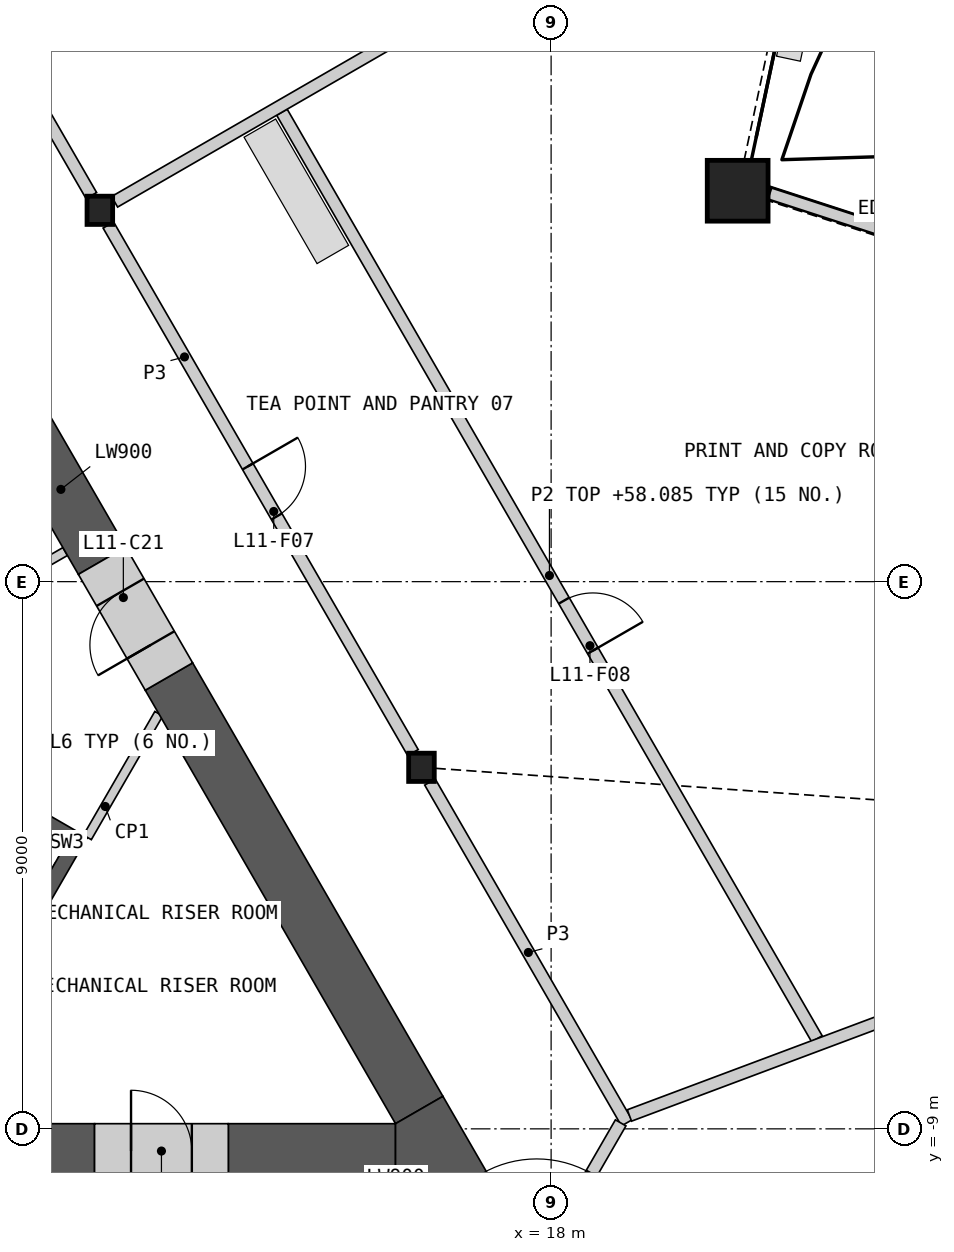
"""IFC4 building model, lengths in metres.
Left out: names, types, materials, properties, quantities, classifications, styles, units other than length and angle.
Written with IfcOpenShell. Run it as: python <this file> out.ifc"""

import sys

from ifc_helpers import new_model, si_unit, direction, frame, frame_2d, origin, origin_2d, place, context, subcontext, project, spatial, polyline, rectangle, hollow_rectangle, i_section, outline, extrude, element, fill, save


model = new_model("IFC4")
c1 = context("Model", 3, precision=1e-05, world=origin(), true_north=direction((0.0, 1.0)))
c2 = subcontext(c1, "Body", "Model", "MODEL_VIEW")
j1 = project(units=[si_unit("LENGTHUNIT", "METRE"), si_unit("PLANEANGLEUNIT", "RADIAN")], contexts=[c1])
p1 = place(None, origin())
s1 = spatial("IfcSite", under=j1, at=p1, CompositionType="ELEMENT")
p2 = place(p1, origin())
s2 = spatial("IfcBuilding", under=s1, at=p2, CompositionType="ELEMENT")
p3 = place(p2, frame((0.0, 0.0, 55.2)))
s3 = spatial("IfcBuildingStorey", under=s2, at=p3, CompositionType="ELEMENT", Elevation=55.2)
p4 = place(p3, frame((21.068, 6.429, 0.0), z_axis=(0.0, 0.0, 1.0), x_axis=(1.0, 0.0, 0.0)))
e1 = element("IfcColumn", 1, at=p4, inside=s3, PredefinedType="COLUMN", context=c2, shape_type="SweptSolid", body=[
    extrude(hollow_rectangle(XDim=1.0, YDim=1.0, WallThickness=0.07, at=origin_2d()), origin(), (0.0, 0.0, 1.0), 4.2),
])
for number, where, z_axis, x_axis in (
    (2, (15.868, -3.054, 0.0), (0.0, 0.0, 1.0), (1.0, 0.0, 0.0)),
    (3, (10.578, 6.107, 0.0), (0.0, 0.0, 1.0), (1.0, 0.0, 0.0)),
):
    element("IfcColumn", number, at=place(p3, frame(where, z_axis=z_axis, x_axis=x_axis)), inside=s3, PredefinedType="COLUMN", context=c2, shape_type="SweptSolid", body=[
        extrude(i_section(OverallWidth=0.421, OverallDepth=0.465, WebThickness=0.045, FlangeThickness=0.072, at=origin_2d()), origin(), (0.0, 0.0, 1.0), 4.2),
    ])
p5 = place(p3, frame((26.899, 4.661, 0.0), z_axis=(0.0, 0.0, 1.0), x_axis=(-0.951054004345, 0.309024725255, 0.0)))
e4 = element("IfcWall", 4, at=p5, inside=s3, PredefinedType="SOLIDWALL", context=c2, shape_type="SweptSolid", body=[
    extrude(rectangle(XDim=5.579, YDim=0.2, at=frame_2d((2.79, 0.0))), origin(), (0.0, 0.0, 1.0), 3.189),
])
p6 = place(p5, frame((1.91, 0.0, 0.0)))
e5 = element("IfcOpeningElement", 5, at=p6, cuts=e4, PredefinedType="OPENING", context=c2, shape_type="SweptSolid", body=[
    extrude(rectangle(XDim=1.6, YDim=2.4, at=frame_2d((0.8, 1.2))), frame((0.0, 0.11, 0.0), z_axis=(0.0, -1.0, 0.0), x_axis=(1.0, 0.0, 0.0)), (0.0, 0.0, 1.0), 0.22),
])
p7 = place(p3, origin())
e6 = element("IfcWall", 6, at=p7, inside=s3, PredefinedType="SHEAR", context=c2, shape_type="SweptSolid", body=[
    extrude(outline(polyline([(8.83, -6.881), (10.374, -4.206), (10.032, -4.298), (8.738, -6.539), (8.83, -6.881)])), origin(), (0.0, 0.0, 1.0), 3.8),
])
p8 = place(p3, origin())
e7 = element("IfcWall", 7, at=p8, inside=s3, PredefinedType="SHEAR", context=c2, shape_type="SweptSolid", body=[
    extrude(outline(polyline([(10.032, -4.298), (10.374, -4.206), (5.307, -1.281), (5.182, -1.498), (10.032, -4.298)])), origin(), (0.0, 0.0, 1.0), 3.8),
])
p9 = place(p3, frame((8.268, -0.509, 0.0), z_axis=(0.0, 0.0, 1.0), x_axis=(0.866035824272, 0.499981950752, 0.0)))
e8 = element("IfcWall", 8, at=p9, inside=s3, PredefinedType="PARTITIONING", context=c2, shape_type="SweptSolid", body=[
    extrude(rectangle(XDim=2.009, YDim=0.15, at=frame_2d((1.004, 0.0))), origin(), (0.0, 0.0, 1.0), 3.8),
])
p10 = place(p3, frame((10.374, -4.206, 0.0), z_axis=(0.0, 0.0, 1.0), x_axis=(0.499995339376, 0.86602809458, 0.0)))
e9 = element("IfcWall", 9, at=p10, inside=s3, PredefinedType="PARTITIONING", context=c2, shape_type="SweptSolid", body=[
    extrude(rectangle(XDim=2.349, YDim=0.15, at=frame_2d((1.175, 0.0))), origin(), (0.0, 0.0, 1.0), 3.8),
])
p11 = place(p3, frame((7.209, -9.365, 0.0), z_axis=(0.0, 0.0, 1.0), x_axis=(1.0, 0.0, 0.0)))
e10 = element("IfcWall", 10, at=p11, inside=s3, PredefinedType="SHEAR", context=c2, shape_type="SweptSolid", body=[
    extrude(rectangle(XDim=3.282, YDim=0.9, at=frame_2d((1.641, 0.0))), origin(), (0.0, 0.0, 1.0), 3.8),
])
p12 = place(p3, frame((12.691, -9.365, 0.0), z_axis=(0.0, 0.0, 1.0), x_axis=(1.0, 0.0, 0.0)))
e11 = element("IfcWall", 11, at=p12, inside=s3, PredefinedType="SHEAR", context=c2, shape_type="SweptSolid", body=[
    extrude(rectangle(XDim=2.75, YDim=0.9, at=frame_2d((1.375, 0.0))), origin(), (0.0, 0.0, 1.0), 3.8),
])
p13 = place(p3, frame((15.831, -8.69, 0.0), z_axis=(0.0, 0.0, 1.0), x_axis=(-0.499995435471, 0.8660280391, 0.0)))
e12 = element("IfcWall", 12, at=p13, inside=s3, PredefinedType="SHEAR", context=c2, shape_type="SweptSolid", body=[
    extrude(rectangle(XDim=8.232, YDim=0.9, at=frame_2d((4.116, 0.0))), origin(), (0.0, 0.0, 1.0), 3.8),
])
p14 = place(p3, frame((10.615, 0.344, 0.0), z_axis=(0.0, 0.0, 1.0), x_axis=(-0.500044870432, 0.865999496279, 0.0)))
e13 = element("IfcWall", 13, at=p14, inside=s3, PredefinedType="SHEAR", context=c2, shape_type="SweptSolid", body=[
    extrude(rectangle(XDim=2.709, YDim=0.9, at=frame_2d((1.354, 0.0))), origin(), (0.0, 0.0, 1.0), 3.8),
])
p15 = place(p3, origin())
e14 = element("IfcWall", 14, at=p15, inside=s3, PredefinedType="SHEAR", context=c2, shape_type="SweptSolid", body=[
    extrude(outline(polyline([(15.441, -9.815), (15.441, -8.915), (16.221, -8.465), (17.0, -9.815), (15.441, -9.815)])), origin(), (0.0, 0.0, 1.0), 3.8),
])
p16 = place(p3, frame((10.491, -9.365, 0.0), z_axis=(0.0, 0.0, 1.0), x_axis=(1.0, 0.0, 0.0)))
e15 = element("IfcWall", 15, at=p16, inside=s3, PredefinedType="SHEAR", context=c2, shape_type="SweptSolid", body=[
    extrude(rectangle(XDim=2.2, YDim=0.9, at=frame_2d((1.1, 0.0))), origin(), (0.0, 0.0, 1.0), 3.8),
])
p17 = place(p16, frame((0.6, 0.0, 0.0)))
e16 = element("IfcOpeningElement", 16, at=p17, cuts=e15, PredefinedType="OPENING", context=c2, shape_type="SweptSolid", body=[
    extrude(rectangle(XDim=1.0, YDim=2.1, at=frame_2d((0.5, 1.05))), frame((0.0, 0.46, 0.0), z_axis=(0.0, -1.0, 0.0), x_axis=(1.0, 0.0, 0.0)), (0.0, 0.0, 1.0), 0.92),
])
p18 = place(p3, frame((11.715, -1.561, 0.0), z_axis=(0.0, 0.0, 1.0), x_axis=(-0.499946605688, 0.86605622881, 0.0)))
e17 = element("IfcWall", 17, at=p18, inside=s3, PredefinedType="SHEAR", context=c2, shape_type="SweptSolid", body=[
    extrude(rectangle(XDim=2.2, YDim=0.9, at=frame_2d((1.1, 0.0))), origin(), (0.0, 0.0, 1.0), 3.8),
])
p19 = place(p18, frame((0.6, 0.0, 0.0)))
e18 = element("IfcOpeningElement", 18, at=p19, cuts=e17, PredefinedType="OPENING", context=c2, shape_type="SweptSolid", body=[
    extrude(rectangle(XDim=1.0, YDim=2.1, at=frame_2d((0.5, 1.05))), frame((0.0, 0.46, 0.0), z_axis=(0.0, -1.0, 0.0), x_axis=(1.0, 0.0, 0.0)), (0.0, 0.0, 1.0), 0.92),
])
p20 = place(p3, frame((5.429, 15.026, 0.0), z_axis=(0.0, 0.0, 1.0), x_axis=(0.50001002959, -0.86601961312, 0.0)))
e19 = element("IfcWall", 19, at=p20, inside=s3, PredefinedType="PARTITIONING", context=c2, shape_type="SweptSolid", body=[
    extrude(rectangle(XDim=10.019, YDim=0.2, at=frame_2d((5.009, 0.0))), origin(), (0.0, 0.0, 1.0), 3.8),
])
p21 = place(p20, frame((4.059, 0.0, 0.0)))
e20 = element("IfcOpeningElement", 20, at=p21, cuts=e19, PredefinedType="OPENING", context=c2, shape_type="SweptSolid", body=[
    extrude(rectangle(XDim=1.8, YDim=2.1, at=frame_2d((0.9, 1.05))), frame((0.0, 0.11, 0.0), z_axis=(0.0, -1.0, 0.0), x_axis=(1.0, 0.0, 0.0)), (0.0, 0.0, 1.0), 0.22),
])
p22 = place(p3, frame((10.719, 5.865, 0.0), z_axis=(0.0, 0.0, 1.0), x_axis=(0.49999175339, -0.866030164915, 0.0)))
e21 = element("IfcWall", 21, at=p22, inside=s3, PredefinedType="PARTITIONING", context=c2, shape_type="SweptSolid", body=[
    extrude(rectangle(XDim=10.019, YDim=0.2, at=frame_2d((5.009, 0.0))), origin(), (0.0, 0.0, 1.0), 3.8),
])
p23 = place(p22, frame((4.585, 0.0, 0.0)))
e22 = element("IfcOpeningElement", 22, at=p23, cuts=e21, PredefinedType="OPENING", context=c2, shape_type="SweptSolid", body=[
    extrude(rectangle(XDim=0.95, YDim=2.1, at=frame_2d((0.475, 1.05))), frame((0.0, 0.11, 0.0), z_axis=(0.0, -1.0, 0.0), x_axis=(1.0, 0.0, 0.0)), (0.0, 0.0, 1.0), 0.22),
])
p24 = place(p3, frame((16.008, -3.296, 0.0), z_axis=(0.0, 0.0, 1.0), x_axis=(0.499984737558, -0.86603421538, 0.0)))
e23 = element("IfcWall", 23, at=p24, inside=s3, PredefinedType="PARTITIONING", context=c2, shape_type="SweptSolid", body=[
    extrude(rectangle(XDim=6.473, YDim=0.2, at=frame_2d((3.236, 0.0))), origin(), (0.0, 0.0, 1.0), 3.8),
])
p25 = place(p3, frame((17.281, -12.128, 0.0), z_axis=(0.0, 0.0, 1.0), x_axis=(0.499958791762, 0.866049194065, 0.0)))
e24 = element("IfcWall", 24, at=p25, inside=s3, PredefinedType="PARTITIONING", context=c2, shape_type="SweptSolid", body=[
    extrude(rectangle(XDim=3.726, YDim=0.2, at=frame_2d((1.863, 0.0))), origin(), (0.0, 0.0, 1.0), 3.8),
])
p26 = place(p25, frame((0.963, 0.0, 0.0)))
e25 = element("IfcOpeningElement", 25, at=p26, cuts=e24, PredefinedType="OPENING", context=c2, shape_type="SweptSolid", body=[
    extrude(rectangle(XDim=1.8, YDim=2.1, at=frame_2d((0.9, 1.05))), frame((0.0, 0.11, 0.0), z_axis=(0.0, -1.0, 0.0), x_axis=(1.0, 0.0, 0.0)), (0.0, 0.0, 1.0), 0.22),
])
p27 = place(p3, frame((13.573, 7.721, 0.0), z_axis=(0.0, 0.0, 1.0), x_axis=(0.499990262232, -0.866031025814, 0.0)))
e26 = element("IfcWall", 26, at=p27, inside=s3, PredefinedType="PARTITIONING", context=c2, shape_type="SweptSolid", body=[
    extrude(rectangle(XDim=17.597, YDim=0.2, at=frame_2d((8.799, 0.0))), origin(), (0.0, 0.0, 1.0), 2.885),
])
p28 = place(p27, frame((9.277, 0.0, 0.0)))
e27 = element("IfcOpeningElement", 27, at=p28, cuts=e26, PredefinedType="OPENING", context=c2, shape_type="SweptSolid", body=[
    extrude(rectangle(XDim=0.95, YDim=2.1, at=frame_2d((0.475, 1.05))), frame((0.0, 0.11, 0.0), z_axis=(0.0, -1.0, 0.0), x_axis=(1.0, 0.0, 0.0)), (0.0, 0.0, 1.0), 0.22),
])
p29 = place(p3, frame((19.288, -8.78, 0.0), z_axis=(0.0, 0.0, 1.0), x_axis=(0.93644254502, 0.350820979814, 0.0)))
e28 = element("IfcWall", 28, at=p29, inside=s3, PredefinedType="PARTITIONING", context=c2, shape_type="SweptSolid", body=[
    extrude(rectangle(XDim=13.447, YDim=0.2, at=frame_2d((6.723, 0.0))), origin(), (0.0, 0.0, 1.0), 2.885),
])
p30 = place(p3, frame((10.821, 6.247, 0.0), z_axis=(0.0, 0.0, 1.0), x_axis=(0.866026729935, 0.499997703033, 0.0)))
e29 = element("IfcWall", 29, at=p30, inside=s3, PredefinedType="PARTITIONING", context=c2, shape_type="SweptSolid", body=[
    extrude(rectangle(XDim=12.848, YDim=0.2, at=frame_2d((6.424, 0.0))), origin(), (0.0, 0.0, 1.0), 2.885),
])
p31 = place(p17, origin())
e30 = element("IfcDoor", 30, at=p31, inside=s3, OperationType="SINGLE_SWING_LEFT", PredefinedType="DOOR", context=c2, shape_type="SweptSolid", body=[
    extrude(rectangle(XDim=1.0, YDim=2.1, at=frame_2d((0.5, 1.05))), frame((0.0, 0.205, 0.0), z_axis=(0.0, -1.0, 0.0), x_axis=(1.0, 0.0, 0.0)), (0.0, 0.0, 1.0), 0.05),
])
fill(e16, e30)
p32 = place(p19, origin())
e31 = element("IfcDoor", 31, at=p32, inside=s3, OperationType="SINGLE_SWING_LEFT", PredefinedType="DOOR", context=c2, shape_type="SweptSolid", body=[
    extrude(rectangle(XDim=1.0, YDim=2.1, at=frame_2d((0.5, 1.05))), frame((0.0, 0.205, 0.0), z_axis=(0.0, -1.0, 0.0), x_axis=(1.0, 0.0, 0.0)), (0.0, 0.0, 1.0), 0.05),
])
fill(e18, e31)
p33 = place(p23, origin())
e32 = element("IfcDoor", 32, at=p33, inside=s3, OperationType="SINGLE_SWING_LEFT", PredefinedType="DOOR", context=c2, shape_type="SweptSolid", body=[
    extrude(rectangle(XDim=0.95, YDim=2.1, at=frame_2d((0.475, 1.05))), frame((0.0, 0.025, 0.0), z_axis=(0.0, -1.0, 0.0), x_axis=(1.0, 0.0, 0.0)), (0.0, 0.0, 1.0), 0.05),
])
fill(e22, e32)
p34 = place(p28, origin())
e33 = element("IfcDoor", 33, at=p34, inside=s3, OperationType="SINGLE_SWING_RIGHT", PredefinedType="DOOR", context=c2, shape_type="SweptSolid", body=[
    extrude(rectangle(XDim=0.95, YDim=2.1, at=frame_2d((0.475, 1.05))), frame((0.0, 0.025, 0.0), z_axis=(0.0, -1.0, 0.0), x_axis=(1.0, 0.0, 0.0)), (0.0, 0.0, 1.0), 0.05),
])
fill(e27, e33)
save(model, sys.argv[1])
